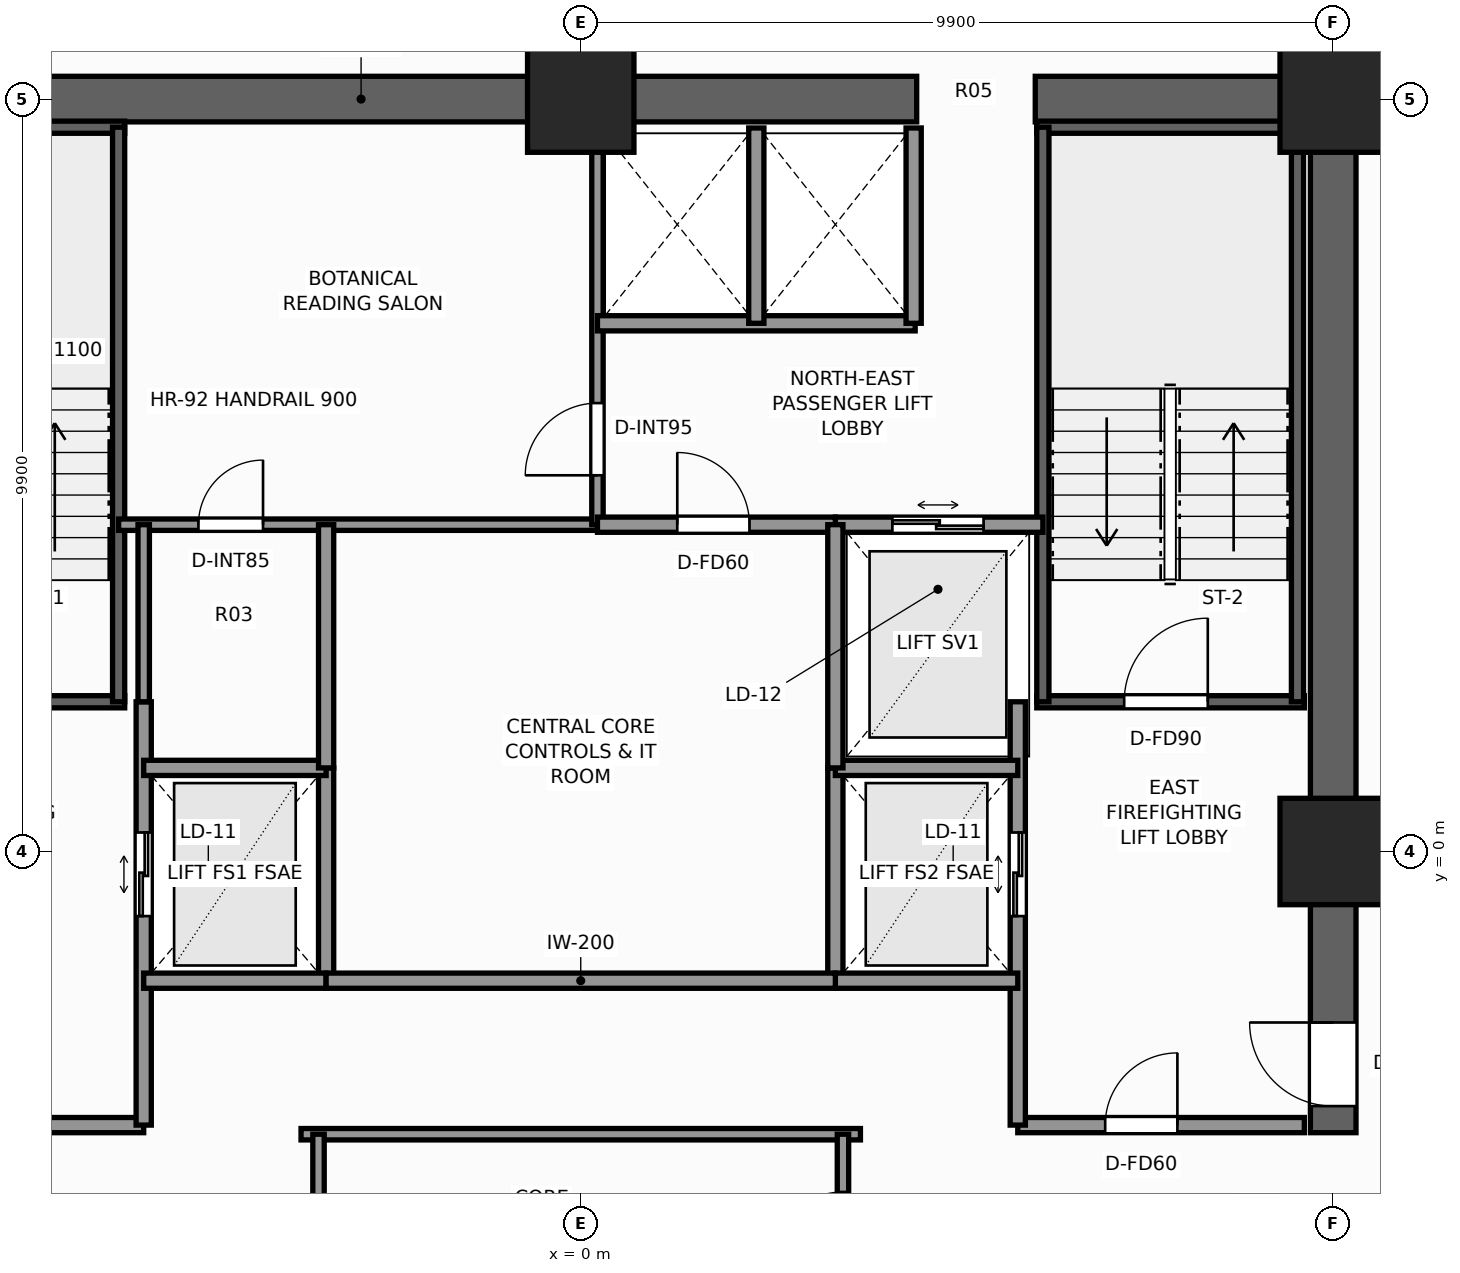
"""IFC4 building model, lengths in metres.
Left out: names, types, materials, properties, quantities, classifications, styles, units other than length and angle.
Written with IfcOpenShell. Run it as: python <this file> out.ifc"""

import sys

from ifc_helpers import new_model, si_unit, direction, frame, frame_2d, origin, origin_2d, place, context, subcontext, project, spatial, rectangle, extrude, element, fill, save


model = new_model("IFC4")
c1 = context("Model", 3, precision=1e-05, world=origin(), true_north=direction((0.0, 1.0)))
c2 = subcontext(c1, "Body", "Model", "MODEL_VIEW")
j1 = project(units=[si_unit("LENGTHUNIT", "METRE"), si_unit("PLANEANGLEUNIT", "RADIAN")], contexts=[c1])
p1 = place(None, origin())
s1 = spatial("IfcSite", under=j1, at=p1, CompositionType="ELEMENT")
p2 = place(p1, origin())
s2 = spatial("IfcBuilding", under=s1, at=p2, CompositionType="ELEMENT")
p3 = place(p2, frame((0.0, 0.0, 75.5)))
s3 = spatial("IfcBuildingStorey", under=s2, at=p3, CompositionType="ELEMENT", Elevation=75.5)
p4 = place(p3, frame((-10.2, 9.9, 0.0), z_axis=(0.0, 0.0, 1.0), x_axis=(1.0, 0.0, 0.0)))
e1 = element("IfcWall", 1, at=p4, inside=s3, PredefinedType="SHEAR", context=c2, shape_type="SweptSolid", body=[
    extrude(rectangle(XDim=14.62, YDim=0.6, at=frame_2d((7.31, 0.0))), origin(), (0.0, 0.0, 1.0), 3.3),
])
p5 = place(p3, frame((5.98, 9.9, 0.0), z_axis=(0.0, 0.0, 1.0), x_axis=(1.0, 0.0, 0.0)))
e2 = element("IfcWall", 2, at=p5, inside=s3, PredefinedType="SHEAR", context=c2, shape_type="SweptSolid", body=[
    extrude(rectangle(XDim=4.22, YDim=0.6, at=frame_2d((2.11, 0.0))), origin(), (0.0, 0.0, 1.0), 3.3),
])
p6 = place(p3, frame((9.9, -3.7, 0.0), z_axis=(0.0, 0.0, 1.0), x_axis=(0.0, 1.0, 0.0)))
e3 = element("IfcWall", 3, at=p6, inside=s3, PredefinedType="SHEAR", context=c2, shape_type="SweptSolid", body=[
    extrude(rectangle(XDim=13.3, YDim=0.6, at=frame_2d((6.65, 0.0))), origin(), (0.0, 0.0, 1.0), 3.3),
])
p7 = place(p6, frame((0.35, 0.0, 0.0)))
e4 = element("IfcOpeningElement", 4, at=p7, cuts=e3, PredefinedType="OPENING", context=c2, shape_type="SweptSolid", body=[
    extrude(rectangle(XDim=1.1, YDim=2.2, at=frame_2d((0.55, 1.1))), frame((0.0, 0.31, 0.0), z_axis=(0.0, -1.0, 0.0), x_axis=(1.0, 0.0, 0.0)), (0.0, 0.0, 1.0), 0.62),
])
for number, where, z_axis, x_axis in (
    (5, (9.9, 9.9, 0.0), (0.0, 0.0, 1.0), (1.0, 0.0, 0.0)),
    (6, (9.9, 0.0, 0.0), (0.0, 0.0, 1.0), (1.0, 0.0, 0.0)),
    (7, (0.0, 9.9, 0.0), (0.0, 0.0, 1.0), (1.0, 0.0, 0.0)),
):
    element("IfcColumn", number, at=place(p3, frame(where, z_axis=z_axis, x_axis=x_axis)), inside=s3, PredefinedType="COLUMN", context=c2, shape_type="SweptSolid", body=[
        extrude(rectangle(XDim=1.4, YDim=1.4, at=origin_2d()), origin(), (0.0, 0.0, 1.0), 3.3),
    ])
p8 = place(p3, frame((-9.52, 1.97, 0.0), z_axis=(0.0, 0.0, 1.0), x_axis=(1.0, 0.0, 0.0)))
e8 = element("IfcWall", 8, at=p8, inside=s3, PredefinedType="SHEAR", context=c2, shape_type="SweptSolid", body=[
    extrude(rectangle(XDim=3.52, YDim=0.16, at=frame_2d((1.76, 0.0))), origin(), (0.0, 0.0, 1.0), 3.3),
])
p9 = place(p8, frame((1.15, 0.0, 0.0)))
e9 = element("IfcOpeningElement", 9, at=p9, cuts=e8, PredefinedType="OPENING", context=c2, shape_type="SweptSolid", body=[
    extrude(rectangle(XDim=1.1, YDim=2.2, at=frame_2d((0.55, 1.1))), frame((0.0, 0.09, 0.0), z_axis=(0.0, -1.0, 0.0), x_axis=(1.0, 0.0, 0.0)), (0.0, 0.0, 1.0), 0.18),
])
p10 = place(p3, frame((-9.52, 9.53, 0.0), z_axis=(0.0, 0.0, 1.0), x_axis=(1.0, 0.0, 0.0)))
e10 = element("IfcWall", 10, at=p10, inside=s3, PredefinedType="SHEAR", context=c2, shape_type="SweptSolid", body=[
    extrude(rectangle(XDim=3.52, YDim=0.16, at=frame_2d((1.76, 0.0))), origin(), (0.0, 0.0, 1.0), 3.3),
])
p11 = place(p3, frame((-6.08, 1.97, 0.0), z_axis=(0.0, 0.0, 1.0), x_axis=(0.0, 1.0, 0.0)))
e11 = element("IfcWall", 11, at=p11, inside=s3, PredefinedType="SHEAR", context=c2, shape_type="SweptSolid", body=[
    extrude(rectangle(XDim=7.56, YDim=0.16, at=frame_2d((3.78, 0.0))), origin(), (0.0, 0.0, 1.0), 3.3),
])
p12 = place(p3, frame((6.0, 1.97, 0.0), z_axis=(0.0, 0.0, 1.0), x_axis=(1.0, 0.0, 0.0)))
e12 = element("IfcWall", 12, at=p12, inside=s3, PredefinedType="SHEAR", context=c2, shape_type="SweptSolid", body=[
    extrude(rectangle(XDim=3.52, YDim=0.16, at=frame_2d((1.76, 0.0))), origin(), (0.0, 0.0, 1.0), 3.3),
])
p13 = place(p12, frame((1.15, 0.0, 0.0)))
e13 = element("IfcOpeningElement", 13, at=p13, cuts=e12, PredefinedType="OPENING", context=c2, shape_type="SweptSolid", body=[
    extrude(rectangle(XDim=1.1, YDim=2.2, at=frame_2d((0.55, 1.1))), frame((0.0, 0.09, 0.0), z_axis=(0.0, -1.0, 0.0), x_axis=(1.0, 0.0, 0.0)), (0.0, 0.0, 1.0), 0.18),
])
p14 = place(p3, frame((6.0, 9.53, 0.0), z_axis=(0.0, 0.0, 1.0), x_axis=(1.0, 0.0, 0.0)))
e14 = element("IfcWall", 14, at=p14, inside=s3, PredefinedType="SHEAR", context=c2, shape_type="SweptSolid", body=[
    extrude(rectangle(XDim=3.52, YDim=0.16, at=frame_2d((1.76, 0.0))), origin(), (0.0, 0.0, 1.0), 3.3),
])
for number, where, z_axis, x_axis in (
    (15, (6.08, 1.97, 0.0), (0.0, 0.0, 1.0), (0.0, 1.0, 0.0)),
    (16, (9.43, 1.97, 0.0), (0.0, 0.0, 1.0), (0.0, 1.0, 0.0)),
):
    element("IfcWall", number, at=place(p3, frame(where, z_axis=z_axis, x_axis=x_axis)), inside=s3, PredefinedType="SHEAR", context=c2, shape_type="SweptSolid", body=[
        extrude(rectangle(XDim=7.56, YDim=0.16, at=frame_2d((3.78, 0.0))), origin(), (0.0, 0.0, 1.0), 3.3),
    ])
p15 = place(p3, frame((-9.52, -3.6, 0.0), z_axis=(0.0, 0.0, 1.0), x_axis=(1.0, 0.0, 0.0)))
e17 = element("IfcWall", 17, at=p15, inside=s3, PredefinedType="SOLIDWALL", context=c2, shape_type="SweptSolid", body=[
    extrude(rectangle(XDim=3.77, YDim=0.2, at=frame_2d((1.885, 0.0))), origin(), (0.0, 0.0, 1.0), 3.08),
])
p16 = place(p15, frame((1.15, 0.0, 0.0)))
e18 = element("IfcOpeningElement", 18, at=p16, cuts=e17, PredefinedType="OPENING", context=c2, shape_type="SweptSolid", body=[
    extrude(rectangle(XDim=0.95, YDim=2.06, at=frame_2d((0.475, 1.03))), frame((0.0, 0.11, 0.0), z_axis=(0.0, -1.0, 0.0), x_axis=(1.0, 0.0, 0.0)), (0.0, 0.0, 1.0), 0.22),
])
p17 = place(p3, frame((-5.75, -3.6, 0.0), z_axis=(0.0, 0.0, 1.0), x_axis=(0.0, 1.0, 0.0)))
e19 = element("IfcWall", 19, at=p17, inside=s3, PredefinedType="SOLIDWALL", context=c2, shape_type="SweptSolid", body=[
    extrude(rectangle(XDim=5.57, YDim=0.2, at=frame_2d((2.785, 0.0))), origin(), (0.0, 0.0, 1.0), 3.08),
])
p18 = place(p17, frame((2.75, 0.0, 0.0)))
e20 = element("IfcOpeningElement", 20, at=p18, cuts=e19, PredefinedType="OPENING", context=c2, shape_type="SweptSolid", body=[
    extrude(rectangle(XDim=1.1, YDim=2.2, at=frame_2d((0.55, 1.1))), frame((0.0, 0.11, 0.0), z_axis=(0.0, -1.0, 0.0), x_axis=(1.0, 0.0, 0.0)), (0.0, 0.0, 1.0), 0.22),
])
p19 = place(p3, frame((-3.35, -1.7, 0.0), z_axis=(0.0, 0.0, 1.0), x_axis=(0.0, 1.0, 0.0)))
e21 = element("IfcWall", 21, at=p19, inside=s3, PredefinedType="SOLIDWALL", context=c2, shape_type="SweptSolid", body=[
    extrude(rectangle(XDim=2.8, YDim=0.2, at=frame_2d((1.4, 0.0))), origin(), (0.0, 0.0, 1.0), 3.08),
])
for number, where, z_axis, x_axis in (
    (22, (-5.75, -1.7, 0.0), (0.0, 0.0, 1.0), (1.0, 0.0, 0.0)),
    (23, (-5.75, 1.1, 0.0), (0.0, 0.0, 1.0), (1.0, 0.0, 0.0)),
):
    element("IfcWall", number, at=place(p3, frame(where, z_axis=z_axis, x_axis=x_axis)), inside=s3, PredefinedType="SOLIDWALL", context=c2, shape_type="SweptSolid", body=[
        extrude(rectangle(XDim=2.4, YDim=0.2, at=frame_2d((1.2, 0.0))), origin(), (0.0, 0.0, 1.0), 3.08),
    ])
p20 = place(p3, frame((5.75, -3.6, 0.0), z_axis=(0.0, 0.0, 1.0), x_axis=(1.0, 0.0, 0.0)))
e24 = element("IfcWall", 24, at=p20, inside=s3, PredefinedType="SOLIDWALL", context=c2, shape_type="SweptSolid", body=[
    extrude(rectangle(XDim=3.77, YDim=0.2, at=frame_2d((1.885, 0.0))), origin(), (0.0, 0.0, 1.0), 3.08),
])
p21 = place(p20, frame((1.15, 0.0, 0.0)))
e25 = element("IfcOpeningElement", 25, at=p21, cuts=e24, PredefinedType="OPENING", context=c2, shape_type="SweptSolid", body=[
    extrude(rectangle(XDim=0.95, YDim=2.06, at=frame_2d((0.475, 1.03))), frame((0.0, 0.11, 0.0), z_axis=(0.0, -1.0, 0.0), x_axis=(1.0, 0.0, 0.0)), (0.0, 0.0, 1.0), 0.22),
])
p22 = place(p3, frame((5.75, -3.6, 0.0), z_axis=(0.0, 0.0, 1.0), x_axis=(0.0, 1.0, 0.0)))
e26 = element("IfcWall", 26, at=p22, inside=s3, PredefinedType="SOLIDWALL", context=c2, shape_type="SweptSolid", body=[
    extrude(rectangle(XDim=5.57, YDim=0.2, at=frame_2d((2.785, 0.0))), origin(), (0.0, 0.0, 1.0), 3.08),
])
p23 = place(p22, frame((2.75, 0.0, 0.0)))
e27 = element("IfcOpeningElement", 27, at=p23, cuts=e26, PredefinedType="OPENING", context=c2, shape_type="SweptSolid", body=[
    extrude(rectangle(XDim=1.1, YDim=2.2, at=frame_2d((0.55, 1.1))), frame((0.0, 0.11, 0.0), z_axis=(0.0, -1.0, 0.0), x_axis=(1.0, 0.0, 0.0)), (0.0, 0.0, 1.0), 0.22),
])
p24 = place(p3, frame((3.35, -1.7, 0.0), z_axis=(0.0, 0.0, 1.0), x_axis=(0.0, 1.0, 0.0)))
e28 = element("IfcWall", 28, at=p24, inside=s3, PredefinedType="SOLIDWALL", context=c2, shape_type="SweptSolid", body=[
    extrude(rectangle(XDim=2.8, YDim=0.2, at=frame_2d((1.4, 0.0))), origin(), (0.0, 0.0, 1.0), 3.08),
])
for number, where, z_axis, x_axis in (
    (29, (3.35, -1.7, 0.0), (0.0, 0.0, 1.0), (1.0, 0.0, 0.0)),
    (30, (3.35, 1.1, 0.0), (0.0, 0.0, 1.0), (1.0, 0.0, 0.0)),
):
    element("IfcWall", number, at=place(p3, frame(where, z_axis=z_axis, x_axis=x_axis)), inside=s3, PredefinedType="SOLIDWALL", context=c2, shape_type="SweptSolid", body=[
        extrude(rectangle(XDim=2.4, YDim=0.2, at=frame_2d((1.2, 0.0))), origin(), (0.0, 0.0, 1.0), 3.08),
    ])
p25 = place(p3, frame((3.35, 4.3, 0.0), z_axis=(0.0, 0.0, 1.0), x_axis=(1.0, 0.0, 0.0)))
e31 = element("IfcWall", 31, at=p25, inside=s3, PredefinedType="SOLIDWALL", context=c2, shape_type="SweptSolid", body=[
    extrude(rectangle(XDim=2.73, YDim=0.2, at=frame_2d((1.365, 0.0))), origin(), (0.0, 0.0, 1.0), 3.08),
])
p26 = place(p25, frame((0.75, 0.0, 0.0)))
e32 = element("IfcOpeningElement", 32, at=p26, cuts=e31, PredefinedType="OPENING", context=c2, shape_type="SweptSolid", body=[
    extrude(rectangle(XDim=1.2, YDim=2.25, at=frame_2d((0.6, 1.125))), frame((0.0, 0.11, 0.0), z_axis=(0.0, -1.0, 0.0), x_axis=(1.0, 0.0, 0.0)), (0.0, 0.0, 1.0), 0.22),
])
p27 = place(p3, frame((-6.08, 4.3, 0.0), z_axis=(0.0, 0.0, 1.0), x_axis=(1.0, 0.0, 0.0)))
e33 = element("IfcWall", 33, at=p27, inside=s3, PredefinedType="PARTITIONING", context=c2, shape_type="SweptSolid", body=[
    extrude(rectangle(XDim=6.3, YDim=0.15, at=frame_2d((3.15, 0.0))), origin(), (0.0, 0.0, 1.0), 3.08),
])
p28 = place(p27, frame((1.05, 0.0, 0.0)))
e34 = element("IfcOpeningElement", 34, at=p28, cuts=e33, PredefinedType="OPENING", context=c2, shape_type="SweptSolid", body=[
    extrude(rectangle(XDim=0.85, YDim=2.03, at=frame_2d((0.425, 1.015))), frame((0.0, 0.085, 0.0), z_axis=(0.0, -1.0, 0.0), x_axis=(1.0, 0.0, 0.0)), (0.0, 0.0, 1.0), 0.17),
])
p29 = place(p3, frame((0.22, 4.3, 0.0), z_axis=(0.0, 0.0, 1.0), x_axis=(0.0, 1.0, 0.0)))
e35 = element("IfcWall", 35, at=p29, inside=s3, PredefinedType="PARTITIONING", context=c2, shape_type="SweptSolid", body=[
    extrude(rectangle(XDim=5.22, YDim=0.15, at=frame_2d((2.61, 0.0))), origin(), (0.0, 0.0, 1.0), 3.08),
])
p30 = place(p29, frame((0.65, 0.0, 0.0)))
e36 = element("IfcOpeningElement", 36, at=p30, cuts=e35, PredefinedType="OPENING", context=c2, shape_type="SweptSolid", body=[
    extrude(rectangle(XDim=0.95, YDim=2.06, at=frame_2d((0.475, 1.03))), frame((0.0, 0.085, 0.0), z_axis=(0.0, -1.0, 0.0), x_axis=(1.0, 0.0, 0.0)), (0.0, 0.0, 1.0), 0.17),
])
p31 = place(p3, frame((0.22, 6.95, 0.0), z_axis=(0.0, 0.0, 1.0), x_axis=(1.0, 0.0, 0.0)))
e37 = element("IfcWall", 37, at=p31, inside=s3, PredefinedType="SOLIDWALL", context=c2, shape_type="SweptSolid", body=[
    extrude(rectangle(XDim=4.18, YDim=0.2, at=frame_2d((2.09, 0.0))), origin(), (0.0, 0.0, 1.0), 3.08),
])
for number, where, z_axis, x_axis in (
    (38, (4.38, 6.95, 0.0), (0.0, 0.0, 1.0), (0.0, 1.0, 0.0)),
    (39, (2.31, 6.95, 0.0), (0.0, 0.0, 1.0), (0.0, 1.0, 0.0)),
):
    element("IfcWall", number, at=place(p3, frame(where, z_axis=z_axis, x_axis=x_axis)), inside=s3, PredefinedType="SOLIDWALL", context=c2, shape_type="SweptSolid", body=[
        extrude(rectangle(XDim=2.57, YDim=0.2, at=frame_2d((1.285, 0.0))), origin(), (0.0, 0.0, 1.0), 3.08),
    ])
p32 = place(p3, frame((0.22, 4.3, 0.0), z_axis=(0.0, 0.0, 1.0), x_axis=(1.0, 0.0, 0.0)))
e40 = element("IfcWall", 40, at=p32, inside=s3, PredefinedType="SOLIDWALL", context=c2, shape_type="SweptSolid", body=[
    extrude(rectangle(XDim=3.13, YDim=0.2, at=frame_2d((1.565, 0.0))), origin(), (0.0, 0.0, 1.0), 3.08),
])
p33 = place(p32, frame((1.05, 0.0, 0.0)))
e41 = element("IfcOpeningElement", 41, at=p33, cuts=e40, PredefinedType="OPENING", context=c2, shape_type="SweptSolid", body=[
    extrude(rectangle(XDim=0.95, YDim=2.06, at=frame_2d((0.475, 1.03))), frame((0.0, 0.11, 0.0), z_axis=(0.0, -1.0, 0.0), x_axis=(1.0, 0.0, 0.0)), (0.0, 0.0, 1.0), 0.22),
])
p34 = place(p3, frame((-3.35, -1.7, 0.0), z_axis=(0.0, 0.0, 1.0), x_axis=(1.0, 0.0, 0.0)))
e42 = element("IfcWall", 42, at=p34, inside=s3, PredefinedType="SOLIDWALL", context=c2, shape_type="SweptSolid", body=[
    extrude(rectangle(XDim=6.7, YDim=0.2, at=frame_2d((3.35, 0.0))), origin(), (0.0, 0.0, 1.0), 3.08),
])
for number, where, z_axis, x_axis in (
    (43, (-3.35, 1.1, 0.0), (0.0, 0.0, 1.0), (0.0, 1.0, 0.0)),
    (44, (3.35, 1.1, 0.0), (0.0, 0.0, 1.0), (0.0, 1.0, 0.0)),
):
    element("IfcWall", number, at=place(p3, frame(where, z_axis=z_axis, x_axis=x_axis)), inside=s3, PredefinedType="SOLIDWALL", context=c2, shape_type="SweptSolid", body=[
        extrude(rectangle(XDim=3.2, YDim=0.2, at=frame_2d((1.6, 0.0))), origin(), (0.0, 0.0, 1.0), 3.08),
    ])
p35 = place(p3, frame((-3.68, -3.72, 0.0), z_axis=(0.0, 0.0, 1.0), x_axis=(1.0, 0.0, 0.0)))
e45 = element("IfcWall", 45, at=p35, inside=s3, PredefinedType="PARTITIONING", context=c2, shape_type="SweptSolid", body=[
    extrude(rectangle(XDim=7.36, YDim=0.15, at=frame_2d((3.68, 0.0))), origin(), (0.0, 0.0, 1.0), 3.08),
])
p36 = place(p3, frame((3.45, -6.08, 0.0), z_axis=(0.0, 0.0, 1.0), x_axis=(0.0, 1.0, 0.0)))
e46 = element("IfcWall", 46, at=p36, inside=s3, PredefinedType="PARTITIONING", context=c2, shape_type="SweptSolid", body=[
    extrude(rectangle(XDim=2.36, YDim=0.15, at=frame_2d((1.18, 0.0))), origin(), (0.0, 0.0, 1.0), 3.08),
])
p37 = place(p36, frame((0.65, 0.0, 0.0)))
e47 = element("IfcOpeningElement", 47, at=p37, cuts=e46, PredefinedType="OPENING", context=c2, shape_type="SweptSolid", body=[
    extrude(rectangle(XDim=0.95, YDim=2.06, at=frame_2d((0.475, 1.03))), frame((0.0, 0.085, 0.0), z_axis=(0.0, -1.0, 0.0), x_axis=(1.0, 0.0, 0.0)), (0.0, 0.0, 1.0), 0.17),
])
p38 = place(p3, frame((-3.45, -6.08, 0.0), z_axis=(0.0, 0.0, 1.0), x_axis=(0.0, 1.0, 0.0)))
e48 = element("IfcWall", 48, at=p38, inside=s3, PredefinedType="PARTITIONING", context=c2, shape_type="SweptSolid", body=[
    extrude(rectangle(XDim=2.36, YDim=0.15, at=frame_2d((1.18, 0.0))), origin(), (0.0, 0.0, 1.0), 3.08),
])
p39 = place(p3, frame((-5.75, 1.97, 0.0), z_axis=(0.0, 0.0, 1.0), x_axis=(0.0, 1.0, 0.0)))
e49 = element("IfcWall", 49, at=p39, inside=s3, PredefinedType="PARTITIONING", context=c2, shape_type="SweptSolid", body=[
    extrude(rectangle(XDim=2.33, YDim=0.15, at=frame_2d((1.165, 0.0))), origin(), (0.0, 0.0, 1.0), 3.08),
])
p40 = place(p13, origin())
e50 = element("IfcDoor", 50, at=p40, inside=s3, OperationType="SINGLE_SWING_RIGHT", PredefinedType="DOOR", context=c2, shape_type="SweptSolid", body=[
    extrude(rectangle(XDim=1.1, YDim=2.2, at=frame_2d((0.55, 1.1))), frame((0.0, 0.025, 0.0), z_axis=(0.0, -1.0, 0.0), x_axis=(1.0, 0.0, 0.0)), (0.0, 0.0, 1.0), 0.05),
])
fill(e13, e50)
p41 = place(p18, origin())
e51 = element("IfcDoor", 51, at=p41, inside=s3, OperationType="DOUBLE_DOOR_SLIDING", PredefinedType="DOOR", context=c2, shape_type="SweptSolid", body=[
    extrude(rectangle(XDim=1.1, YDim=2.2, at=frame_2d((0.55, 1.1))), frame((0.0, 0.025, 0.0), z_axis=(0.0, -1.0, 0.0), x_axis=(1.0, 0.0, 0.0)), (0.0, 0.0, 1.0), 0.05),
])
fill(e20, e51)
p42 = place(p7, origin())
e52 = element("IfcDoor", 52, at=p42, inside=s3, OperationType="SINGLE_SWING_RIGHT", PredefinedType="DOOR", context=c2, shape_type="SweptSolid", body=[
    extrude(rectangle(XDim=1.1, YDim=2.2, at=frame_2d((0.55, 1.1))), frame((0.0, 0.025, 0.0), z_axis=(0.0, -1.0, 0.0), x_axis=(1.0, 0.0, 0.0)), (0.0, 0.0, 1.0), 0.05),
])
fill(e4, e52)
p43 = place(p23, origin())
e53 = element("IfcDoor", 53, at=p43, inside=s3, OperationType="DOUBLE_DOOR_SLIDING", PredefinedType="DOOR", context=c2, shape_type="SweptSolid", body=[
    extrude(rectangle(XDim=1.1, YDim=2.2, at=frame_2d((0.55, 1.1))), frame((0.0, 0.025, 0.0), z_axis=(0.0, -1.0, 0.0), x_axis=(1.0, 0.0, 0.0)), (0.0, 0.0, 1.0), 0.05),
])
fill(e27, e53)
p44 = place(p26, origin())
e54 = element("IfcDoor", 54, at=p44, inside=s3, OperationType="DOUBLE_DOOR_SLIDING", PredefinedType="DOOR", context=c2, shape_type="SweptSolid", body=[
    extrude(rectangle(XDim=1.2, YDim=2.25, at=frame_2d((0.6, 1.125))), frame((0.0, 0.025, 0.0), z_axis=(0.0, -1.0, 0.0), x_axis=(1.0, 0.0, 0.0)), (0.0, 0.0, 1.0), 0.05),
])
fill(e32, e54)
p45 = place(p30, origin())
e55 = element("IfcDoor", 55, at=p45, inside=s3, OperationType="SINGLE_SWING_LEFT", PredefinedType="DOOR", context=c2, shape_type="SweptSolid", body=[
    extrude(rectangle(XDim=0.95, YDim=2.06, at=frame_2d((0.475, 1.03))), frame((0.0, 0.025, 0.0), z_axis=(0.0, -1.0, 0.0), x_axis=(1.0, 0.0, 0.0)), (0.0, 0.0, 1.0), 0.05),
])
fill(e36, e55)
p46 = place(p21, origin())
e56 = element("IfcDoor", 56, at=p46, inside=s3, OperationType="SINGLE_SWING_RIGHT", PredefinedType="DOOR", context=c2, shape_type="SweptSolid", body=[
    extrude(rectangle(XDim=0.95, YDim=2.06, at=frame_2d((0.475, 1.03))), frame((0.0, 0.025, 0.0), z_axis=(0.0, -1.0, 0.0), x_axis=(1.0, 0.0, 0.0)), (0.0, 0.0, 1.0), 0.05),
])
fill(e25, e56)
p47 = place(p33, origin())
e57 = element("IfcDoor", 57, at=p47, inside=s3, OperationType="SINGLE_SWING_LEFT", PredefinedType="DOOR", context=c2, shape_type="SweptSolid", body=[
    extrude(rectangle(XDim=0.95, YDim=2.06, at=frame_2d((0.475, 1.03))), frame((0.0, 0.025, 0.0), z_axis=(0.0, -1.0, 0.0), x_axis=(1.0, 0.0, 0.0)), (0.0, 0.0, 1.0), 0.05),
])
fill(e41, e57)
p48 = place(p37, origin())
e58 = element("IfcDoor", 58, at=p48, inside=s3, OperationType="SINGLE_SWING_LEFT", PredefinedType="DOOR", context=c2, shape_type="SweptSolid", body=[
    extrude(rectangle(XDim=0.95, YDim=2.06, at=frame_2d((0.475, 1.03))), frame((0.0, 0.025, 0.0), z_axis=(0.0, -1.0, 0.0), x_axis=(1.0, 0.0, 0.0)), (0.0, 0.0, 1.0), 0.05),
])
fill(e47, e58)
p49 = place(p28, origin())
e59 = element("IfcDoor", 59, at=p49, inside=s3, OperationType="SINGLE_SWING_RIGHT", PredefinedType="DOOR", context=c2, shape_type="SweptSolid", body=[
    extrude(rectangle(XDim=0.85, YDim=2.03, at=frame_2d((0.425, 1.015))), frame((0.0, 0.025, 0.0), z_axis=(0.0, -1.0, 0.0), x_axis=(1.0, 0.0, 0.0)), (0.0, 0.0, 1.0), 0.05),
])
fill(e34, e59)
save(model, sys.argv[1])
